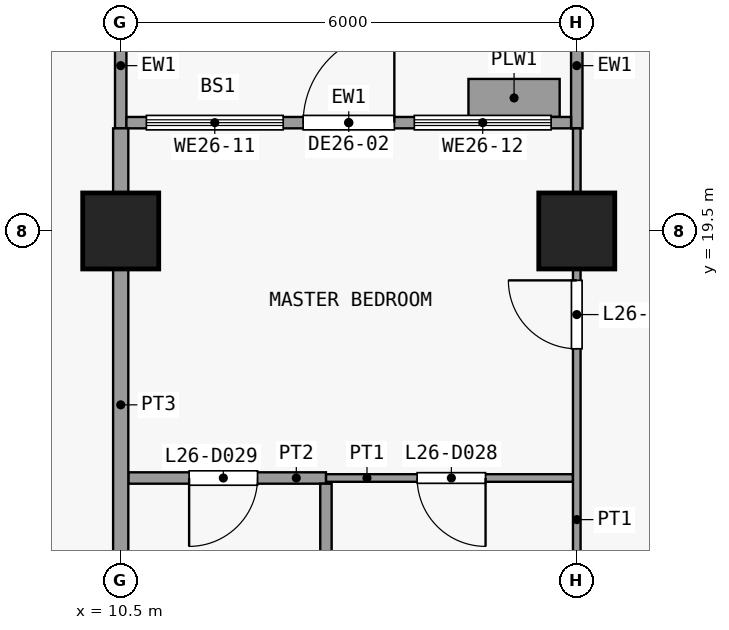
"""IFC4 building model, lengths in metres.
Left out: names, types, materials, properties, quantities, classifications, styles, units other than length and angle.
Written with IfcOpenShell. Run it as: python <this file> out.ifc"""

import sys

from ifc_helpers import new_model, si_unit, direction, frame, frame_2d, origin, origin_2d, place, context, subcontext, project, spatial, rectangle, extrude, element, fill, save


model = new_model("IFC4")
c1 = context("Model", 3, precision=1e-05, world=origin(), true_north=direction((0.0, 1.0)))
c2 = subcontext(c1, "Body", "Model", "MODEL_VIEW")
j1 = project(units=[si_unit("LENGTHUNIT", "METRE"), si_unit("PLANEANGLEUNIT", "RADIAN")], contexts=[c1])
p1 = place(None, origin())
s1 = spatial("IfcSite", under=j1, at=p1, CompositionType="ELEMENT")
p2 = place(p1, origin())
s2 = spatial("IfcBuilding", under=s1, at=p2, CompositionType="ELEMENT")
p3 = place(p2, frame((0.0, 0.0, 106.3)))
s3 = spatial("IfcBuildingStorey", under=s2, at=p3, CompositionType="ELEMENT", Elevation=106.3)
for number, where, z_axis, x_axis in (
    (1, (10.5, 19.5, 0.0), (0.0, 0.0, 1.0), (1.0, 0.0, 0.0)),
    (2, (16.5, 19.5, 0.0), (0.0, 0.0, 1.0), (1.0, 0.0, 0.0)),
):
    element("IfcColumn", number, at=place(p3, frame(where, z_axis=z_axis, x_axis=x_axis)), inside=s3, PredefinedType="COLUMN", context=c2, shape_type="SweptSolid", body=[
        extrude(rectangle(XDim=1.0, YDim=1.0, at=origin_2d()), origin(), (0.0, 0.0, 1.0), 3.6),
    ])
for number, where, z_axis, x_axis in (
    (3, (10.5, 20.85, 0.0), (0.0, 0.0, 1.0), (0.0, 1.0, 0.0)),
    (4, (16.5, 20.85, 0.0), (0.0, 0.0, 1.0), (0.0, 1.0, 0.0)),
):
    element("IfcWall", number, at=place(p3, frame(where, z_axis=z_axis, x_axis=x_axis)), inside=s3, PredefinedType="SOLIDWALL", context=c2, shape_type="SweptSolid", body=[
        extrude(rectangle(XDim=1.65, YDim=0.15, at=frame_2d((0.825, 0.0))), origin(), (0.0, 0.0, 1.0), 3.3),
    ])
p4 = place(p3, frame((10.575, 20.925, 0.0), z_axis=(0.0, 0.0, 1.0), x_axis=(1.0, 0.0, 0.0)))
e5 = element("IfcWall", 5, at=p4, inside=s3, PredefinedType="SOLIDWALL", context=c2, shape_type="SweptSolid", body=[
    extrude(rectangle(XDim=5.85, YDim=0.15, at=frame_2d((2.925, 0.0))), origin(), (0.0, 0.0, 1.0), 3.3),
])
p5 = place(p4, frame((2.325, 0.0, 0.0)))
e6 = element("IfcOpeningElement", 6, at=p5, cuts=e5, PredefinedType="OPENING", context=c2, shape_type="SweptSolid", body=[
    extrude(rectangle(XDim=1.2, YDim=2.4, at=frame_2d((0.6, 1.2))), frame((0.0, 0.085, 0.0), z_axis=(0.0, -1.0, 0.0), x_axis=(1.0, 0.0, 0.0)), (0.0, 0.0, 1.0), 0.17),
])
p6 = place(p4, frame((0.262, 0.0, 0.9)))
e7 = element("IfcOpeningElement", 7, at=p6, cuts=e5, PredefinedType="OPENING", context=c2, shape_type="SweptSolid", body=[
    extrude(rectangle(XDim=1.8, YDim=2.1, at=frame_2d((0.9, 1.05))), frame((0.0, 0.085, 0.0), z_axis=(0.0, -1.0, 0.0), x_axis=(1.0, 0.0, 0.0)), (0.0, 0.0, 1.0), 0.17),
])
p7 = place(p4, frame((3.788, 0.0, 0.9)))
e8 = element("IfcOpeningElement", 8, at=p7, cuts=e5, PredefinedType="OPENING", context=c2, shape_type="SweptSolid", body=[
    extrude(rectangle(XDim=1.8, YDim=2.1, at=frame_2d((0.9, 1.05))), frame((0.0, 0.085, 0.0), z_axis=(0.0, -1.0, 0.0), x_axis=(1.0, 0.0, 0.0)), (0.0, 0.0, 1.0), 0.17),
])
p8 = place(p3, frame((15.075, 21.25, 0.0), z_axis=(0.0, 0.0, 1.0), x_axis=(1.0, 0.0, 0.0)))
e9 = element("IfcWall", 9, at=p8, inside=s3, PredefinedType="USERDEFINED", context=c2, shape_type="SweptSolid", body=[
    extrude(rectangle(XDim=1.2, YDim=0.5, at=frame_2d((0.6, 0.0))), origin(), (0.0, 0.0, 1.0), 0.9),
])
p9 = place(p3, frame((13.2, 16.25, 0.0), z_axis=(0.0, 0.0, 1.0), x_axis=(1.0, 0.0, 0.0)))
e10 = element("IfcWall", 10, at=p9, inside=s3, PredefinedType="PARTITIONING", context=c2, shape_type="SweptSolid", body=[
    extrude(rectangle(XDim=3.25, YDim=0.1, at=frame_2d((1.625, 0.0))), origin(), (0.0, 0.0, 1.0), 3.3),
])
p10 = place(p9, frame((1.2, 0.0, 0.0)))
e11 = element("IfcOpeningElement", 11, at=p10, cuts=e10, PredefinedType="OPENING", context=c2, shape_type="SweptSolid", body=[
    extrude(rectangle(XDim=0.9, YDim=2.1, at=frame_2d((0.45, 1.05))), frame((0.0, 0.06, 0.0), z_axis=(0.0, -1.0, 0.0), x_axis=(1.0, 0.0, 0.0)), (0.0, 0.0, 1.0), 0.12),
])
p11 = place(p3, frame((10.6, 16.25, 0.0), z_axis=(0.0, 0.0, 1.0), x_axis=(1.0, 0.0, 0.0)))
e12 = element("IfcWall", 12, at=p11, inside=s3, PredefinedType="PARTITIONING", context=c2, shape_type="SweptSolid", body=[
    extrude(rectangle(XDim=2.6, YDim=0.15, at=frame_2d((1.3, 0.0))), origin(), (0.0, 0.0, 1.0), 3.3),
])
p12 = place(p11, frame((0.8, 0.0, 0.0)))
e13 = element("IfcOpeningElement", 13, at=p12, cuts=e12, PredefinedType="OPENING", context=c2, shape_type="SweptSolid", body=[
    extrude(rectangle(XDim=0.9, YDim=2.1, at=frame_2d((0.45, 1.05))), frame((0.0, 0.085, 0.0), z_axis=(0.0, -1.0, 0.0), x_axis=(1.0, 0.0, 0.0)), (0.0, 0.0, 1.0), 0.17),
])
p13 = place(p3, frame((10.5, 13.575, 0.0), z_axis=(0.0, 0.0, 1.0), x_axis=(0.0, 1.0, 0.0)))
e14 = element("IfcWall", 14, at=p13, inside=s3, PredefinedType="PARTITIONING", context=c2, shape_type="SweptSolid", body=[
    extrude(rectangle(XDim=7.275, YDim=0.2, at=frame_2d((3.638, 0.0))), origin(), (0.0, 0.0, 1.0), 3.3),
])
p14 = place(p3, frame((13.2, 13.575, 0.0), z_axis=(0.0, 0.0, 1.0), x_axis=(0.0, 1.0, 0.0)))
e15 = element("IfcWall", 15, at=p14, inside=s3, PredefinedType="PARTITIONING", context=c2, shape_type="SweptSolid", body=[
    extrude(rectangle(XDim=2.6, YDim=0.15, at=frame_2d((1.3, 0.0))), origin(), (0.0, 0.0, 1.0), 3.3),
])
p15 = place(p3, frame((16.5, 13.575, 0.0), z_axis=(0.0, 0.0, 1.0), x_axis=(0.0, 1.0, 0.0)))
e16 = element("IfcWall", 16, at=p15, inside=s3, PredefinedType="PARTITIONING", context=c2, shape_type="SweptSolid", body=[
    extrude(rectangle(XDim=7.275, YDim=0.1, at=frame_2d((3.638, 0.0))), origin(), (0.0, 0.0, 1.0), 3.3),
])
p16 = place(p15, frame((4.375, 0.0, 0.0)))
e17 = element("IfcOpeningElement", 17, at=p16, cuts=e16, PredefinedType="OPENING", context=c2, shape_type="SweptSolid", body=[
    extrude(rectangle(XDim=0.9, YDim=2.1, at=frame_2d((0.45, 1.05))), frame((0.0, 0.06, 0.0), z_axis=(0.0, -1.0, 0.0), x_axis=(1.0, 0.0, 0.0)), (0.0, 0.0, 1.0), 0.12),
])
p17 = place(p5, origin())
e18 = element("IfcDoor", 18, at=p17, inside=s3, OperationType="SINGLE_SWING_RIGHT", PredefinedType="DOOR", context=c2, shape_type="SweptSolid", body=[
    extrude(rectangle(XDim=1.2, YDim=2.4, at=frame_2d((0.6, 1.2))), frame((0.0, 0.025, 0.0), z_axis=(0.0, -1.0, 0.0), x_axis=(1.0, 0.0, 0.0)), (0.0, 0.0, 1.0), 0.05),
])
fill(e6, e18)
p18 = place(p6, origin())
e19 = element("IfcWindow", 19, at=p18, inside=s3, PartitioningType="SINGLE_PANEL", PredefinedType="WINDOW", context=c2, shape_type="SweptSolid", body=[
    extrude(rectangle(XDim=1.8, YDim=2.1, at=frame_2d((0.9, 1.05))), frame((0.0, 0.03, 0.0), z_axis=(0.0, -1.0, 0.0), x_axis=(1.0, 0.0, 0.0)), (0.0, 0.0, 1.0), 0.06),
])
fill(e7, e19)
p19 = place(p7, origin())
e20 = element("IfcWindow", 20, at=p19, inside=s3, PartitioningType="SINGLE_PANEL", PredefinedType="WINDOW", context=c2, shape_type="SweptSolid", body=[
    extrude(rectangle(XDim=1.8, YDim=2.1, at=frame_2d((0.9, 1.05))), frame((0.0, 0.03, 0.0), z_axis=(0.0, -1.0, 0.0), x_axis=(1.0, 0.0, 0.0)), (0.0, 0.0, 1.0), 0.06),
])
fill(e8, e20)
p20 = place(p10, origin())
e21 = element("IfcDoor", 21, at=p20, inside=s3, OperationType="SINGLE_SWING_RIGHT", PredefinedType="DOOR", context=c2, shape_type="SweptSolid", body=[
    extrude(rectangle(XDim=0.9, YDim=2.1, at=frame_2d((0.45, 1.05))), frame((0.0, 0.025, 0.0), z_axis=(0.0, -1.0, 0.0), x_axis=(1.0, 0.0, 0.0)), (0.0, 0.0, 1.0), 0.05),
])
fill(e11, e21)
p21 = place(p12, origin())
e22 = element("IfcDoor", 22, at=p21, inside=s3, OperationType="SINGLE_SWING_LEFT", PredefinedType="DOOR", context=c2, shape_type="SweptSolid", body=[
    extrude(rectangle(XDim=0.9, YDim=2.1, at=frame_2d((0.45, 1.05))), frame((0.0, 0.025, 0.0), z_axis=(0.0, -1.0, 0.0), x_axis=(1.0, 0.0, 0.0)), (0.0, 0.0, 1.0), 0.05),
])
fill(e13, e22)
p22 = place(p16, origin())
e23 = element("IfcDoor", 23, at=p22, inside=s3, OperationType="SINGLE_SWING_LEFT", PredefinedType="DOOR", context=c2, shape_type="SweptSolid", body=[
    extrude(rectangle(XDim=0.9, YDim=2.1, at=frame_2d((0.45, 1.05))), frame((0.0, 0.025, 0.0), z_axis=(0.0, -1.0, 0.0), x_axis=(1.0, 0.0, 0.0)), (0.0, 0.0, 1.0), 0.05),
])
fill(e17, e23)
save(model, sys.argv[1])
